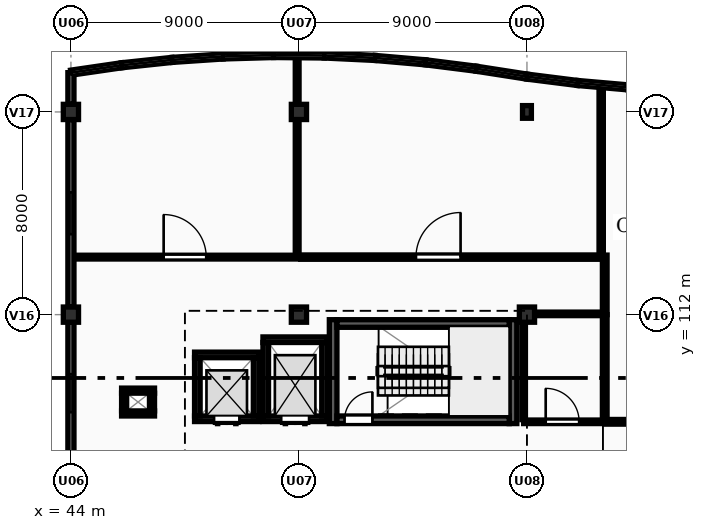
"""IFC4 building model, lengths in metres.
Left out: names, types, materials, properties, quantities, classifications, styles, units other than length and angle.
Written with IfcOpenShell. Run it as: python <this file> out.ifc"""

import sys

from ifc_helpers import new_model, si_unit, direction, frame, frame_2d, origin, origin_2d, place, context, subcontext, project, spatial, rectangle, extrude, element, fill, save


model = new_model("IFC4")
c1 = context("Model", 3, precision=1e-05, world=origin(), true_north=direction((0.0, 1.0)))
c2 = subcontext(c1, "Body", "Model", "MODEL_VIEW")
j1 = project(units=[si_unit("LENGTHUNIT", "METRE"), si_unit("PLANEANGLEUNIT", "RADIAN")], contexts=[c1])
p1 = place(None, origin())
s1 = spatial("IfcSite", under=j1, at=p1, CompositionType="ELEMENT")
p2 = place(p1, origin())
s2 = spatial("IfcBuilding", under=s1, at=p2, CompositionType="ELEMENT")
p3 = place(p2, frame((0.0, 0.0, 4.5)))
s3 = spatial("IfcBuildingStorey", under=s2, at=p3, CompositionType="ELEMENT", Elevation=4.5)
for number, where, z_axis, x_axis in (
    (1, (44.0, 112.0, 0.0), (0.0, 0.0, 1.0), (1.0, 0.0, 0.0)),
    (2, (44.0, 120.0, 0.0), (0.0, 0.0, 1.0), (1.0, 0.0, 0.0)),
    (3, (53.0, 112.0, 0.0), (0.0, 0.0, 1.0), (1.0, 0.0, 0.0)),
    (4, (53.0, 120.0, 0.0), (0.0, 0.0, 1.0), (1.0, 0.0, 0.0)),
    (5, (62.0, 112.0, 0.0), (0.0, 0.0, 1.0), (1.0, 0.0, 0.0)),
):
    element("IfcColumn", number, at=place(p3, frame(where, z_axis=z_axis, x_axis=x_axis)), inside=s3, PredefinedType="COLUMN", context=c2, shape_type="SweptSolid", body=[
        extrude(rectangle(XDim=0.6, YDim=0.6, at=origin_2d()), origin(), (0.0, 0.0, 1.0), 3.9),
    ])
p4 = place(p3, frame((62.0, 120.0, 0.0), z_axis=(0.0, 0.0, 1.0), x_axis=(1.0, 0.0, 0.0)))
e6 = element("IfcColumn", 6, at=p4, inside=s3, PredefinedType="PILASTER", context=c2, shape_type="SweptSolid", body=[
    extrude(rectangle(XDim=0.35, YDim=0.5, at=origin_2d()), origin(), (0.0, 0.0, 1.0), 3.9),
])
p5 = place(p3, frame((44.0, 121.55, 0.0), z_axis=(0.0, 0.0, 1.0), x_axis=(0.989544477223, 0.144228040259, 0.0)))
e7 = element("IfcWall", 7, at=p5, inside=s3, PredefinedType="SOLIDWALL", context=c2, shape_type="SweptSolid", body=[
    extrude(rectangle(XDim=2.021, YDim=0.2, at=frame_2d((1.011, 0.0))), origin(), (0.0, 0.0, 1.0), 0.95),
])
p6 = place(p3, frame((46.0, 121.842, 0.0), z_axis=(0.0, 0.0, 1.0), x_axis=(0.994395160059, 0.105727317433, 0.0)))
e8 = element("IfcWall", 8, at=p6, inside=s3, PredefinedType="SOLIDWALL", context=c2, shape_type="SweptSolid", body=[
    extrude(rectangle(XDim=2.011, YDim=0.2, at=frame_2d((1.006, 0.0))), origin(), (0.0, 0.0, 1.0), 0.95),
])
p7 = place(p3, frame((48.0, 122.054, 0.0), z_axis=(0.0, 0.0, 1.0), x_axis=(0.997729302978, 0.067351599676, 0.0)))
e9 = element("IfcWall", 9, at=p7, inside=s3, PredefinedType="SOLIDWALL", context=c2, shape_type="SweptSolid", body=[
    extrude(rectangle(XDim=2.005, YDim=0.2, at=frame_2d((1.002, 0.0))), origin(), (0.0, 0.0, 1.0), 0.95),
])
p8 = place(p3, frame((50.0, 122.189, 0.0), z_axis=(0.0, 0.0, 1.0), x_axis=(0.999581770858, 0.028918564416, 0.0)))
e10 = element("IfcWall", 10, at=p8, inside=s3, PredefinedType="SOLIDWALL", context=c2, shape_type="SweptSolid", body=[
    extrude(rectangle(XDim=2.001, YDim=0.2, at=frame_2d((1.0, 0.0))), origin(), (0.0, 0.0, 1.0), 0.95),
])
p9 = place(p3, frame((52.0, 122.247, 0.0), z_axis=(0.0, 0.0, 1.0), x_axis=(0.999953504169, -0.009643106302, 0.0)))
e11 = element("IfcWall", 11, at=p9, inside=s3, PredefinedType="SOLIDWALL", context=c2, shape_type="SweptSolid", body=[
    extrude(rectangle(XDim=2.0, YDim=0.2, at=frame_2d((1.0, 0.0))), origin(), (0.0, 0.0, 1.0), 0.95),
])
p10 = place(p3, frame((54.0, 122.228, 0.0), z_axis=(0.0, 0.0, 1.0), x_axis=(0.99884540439, -0.048040172037, 0.0)))
e12 = element("IfcWall", 12, at=p10, inside=s3, PredefinedType="SOLIDWALL", context=c2, shape_type="SweptSolid", body=[
    extrude(rectangle(XDim=2.002, YDim=0.2, at=frame_2d((1.001, 0.0))), origin(), (0.0, 0.0, 1.0), 0.95),
])
p11 = place(p3, frame((56.0, 122.132, 0.0), z_axis=(0.0, 0.0, 1.0), x_axis=(0.996244237948, -0.086587633962, 0.0)))
e13 = element("IfcWall", 13, at=p11, inside=s3, PredefinedType="SOLIDWALL", context=c2, shape_type="SweptSolid", body=[
    extrude(rectangle(XDim=2.008, YDim=0.2, at=frame_2d((1.004, 0.0))), origin(), (0.0, 0.0, 1.0), 0.95),
])
p12 = place(p3, frame((58.0, 121.958, 0.0), z_axis=(0.0, 0.0, 1.0), x_axis=(0.992158168336, -0.124988675503, 0.0)))
e14 = element("IfcWall", 14, at=p12, inside=s3, PredefinedType="SOLIDWALL", context=c2, shape_type="SweptSolid", body=[
    extrude(rectangle(XDim=2.016, YDim=0.2, at=frame_2d((1.008, 0.0))), origin(), (0.0, 0.0, 1.0), 0.95),
])
p13 = place(p3, frame((60.0, 121.706, 0.0), z_axis=(0.0, 0.0, 1.0), x_axis=(0.988085509852, -0.153905897287, 0.0)))
e15 = element("IfcWall", 15, at=p13, inside=s3, PredefinedType="SOLIDWALL", context=c2, shape_type="SweptSolid", body=[
    extrude(rectangle(XDim=2.024, YDim=0.2, at=frame_2d((1.012, 0.0))), origin(), (0.0, 0.0, 1.0), 0.95),
])
p14 = place(p3, frame((62.0, 121.394, 0.0), z_axis=(0.0, 0.0, 1.0), x_axis=(0.992158168336, -0.124988675503, 0.0)))
e16 = element("IfcWall", 16, at=p14, inside=s3, PredefinedType="SOLIDWALL", context=c2, shape_type="SweptSolid", body=[
    extrude(rectangle(XDim=2.016, YDim=0.2, at=frame_2d((1.008, 0.0))), origin(), (0.0, 0.0, 1.0), 0.95),
])
p15 = place(p3, frame((64.0, 121.142, 0.0), z_axis=(0.0, 0.0, 1.0), x_axis=(0.996244237948, -0.086587633962, 0.0)))
e17 = element("IfcWall", 17, at=p15, inside=s3, PredefinedType="SOLIDWALL", context=c2, shape_type="SweptSolid", body=[
    extrude(rectangle(XDim=2.008, YDim=0.2, at=frame_2d((1.004, 0.0))), origin(), (0.0, 0.0, 1.0), 0.95),
])
p16 = place(p3, frame((44.0, 104.3, 0.0), z_axis=(0.0, 0.0, 1.0), x_axis=(0.0, 1.0, 0.0)))
e18 = element("IfcWall", 18, at=p16, inside=s3, PredefinedType="SOLIDWALL", context=c2, shape_type="SweptSolid", body=[
    extrude(rectangle(XDim=7.4, YDim=0.24, at=frame_2d((3.7, 0.0))), origin(), (0.0, 0.0, 1.0), 2.945),
])
p17 = place(p16, frame((3.85, 0.0, 0.95)))
e19 = element("IfcOpeningElement", 19, at=p17, cuts=e18, PredefinedType="OPENING", context=c2, shape_type="SweptSolid", body=[
    extrude(rectangle(XDim=1.5, YDim=1.5, at=frame_2d((0.75, 0.75))), frame((0.0, 0.13, 0.0), z_axis=(0.0, -1.0, 0.0), x_axis=(1.0, 0.0, 0.0)), (0.0, 0.0, 1.0), 0.26),
])
p18 = place(p3, frame((44.0, 112.3, 0.0), z_axis=(0.0, 0.0, 1.0), x_axis=(0.0, 1.0, 0.0)))
e20 = element("IfcWall", 20, at=p18, inside=s3, PredefinedType="SOLIDWALL", context=c2, shape_type="SweptSolid", body=[
    extrude(rectangle(XDim=7.4, YDim=0.24, at=frame_2d((3.7, 0.0))), origin(), (0.0, 0.0, 1.0), 2.945),
])
p19 = place(p18, frame((2.875, 0.0, 0.95)))
e21 = element("IfcOpeningElement", 21, at=p19, cuts=e20, PredefinedType="OPENING", context=c2, shape_type="SweptSolid", body=[
    extrude(rectangle(XDim=1.65, YDim=1.5, at=frame_2d((0.825, 0.75))), frame((0.0, 0.13, 0.0), z_axis=(0.0, -1.0, 0.0), x_axis=(1.0, 0.0, 0.0)), (0.0, 0.0, 1.0), 0.26),
])
p20 = place(p3, frame((44.0, 120.3, 0.0), z_axis=(0.0, 0.0, 1.0), x_axis=(0.0, 1.0, 0.0)))
e22 = element("IfcWall", 22, at=p20, inside=s3, PredefinedType="SOLIDWALL", context=c2, shape_type="SweptSolid", body=[
    extrude(rectangle(XDim=1.25, YDim=0.24, at=frame_2d((0.625, 0.0))), origin(), (0.0, 0.0, 1.0), 2.945),
])
for number, where, z_axis, x_axis in (
    (23, (54.35, 107.7, 0.0), (0.0, 0.0, 1.0), (0.0, 1.0, 0.0)),
    (24, (61.45, 111.8, 0.0), (0.0, 0.0, 1.0), (0.0, -1.0, 0.0)),
):
    element("IfcWall", number, at=place(p3, frame(where, z_axis=z_axis, x_axis=x_axis)), inside=s3, PredefinedType="SHEAR", context=c2, shape_type="SweptSolid", body=[
        extrude(rectangle(XDim=4.1, YDim=0.3, at=frame_2d((2.05, 0.0))), origin(), (0.0, 0.0, 1.0), 3.65),
    ])
p21 = place(p3, frame((54.5, 107.85, 0.0), z_axis=(0.0, 0.0, 1.0), x_axis=(1.0, 0.0, 0.0)))
e25 = element("IfcWall", 25, at=p21, inside=s3, PredefinedType="SHEAR", context=c2, shape_type="SweptSolid", body=[
    extrude(rectangle(XDim=6.8, YDim=0.3, at=frame_2d((3.4, 0.0))), origin(), (0.0, 0.0, 1.0), 3.65),
])
p22 = place(p21, frame((0.3, 0.0, 0.0)))
e26 = element("IfcOpeningElement", 26, at=p22, cuts=e25, PredefinedType="OPENING", context=c2, shape_type="SweptSolid", body=[
    extrude(rectangle(XDim=1.1, YDim=2.15, at=frame_2d((0.55, 1.075))), frame((0.0, 0.16, 0.0), z_axis=(0.0, -1.0, 0.0), x_axis=(1.0, 0.0, 0.0)), (0.0, 0.0, 1.0), 0.32),
])
p23 = place(p3, frame((61.3, 111.65, 0.0), z_axis=(0.0, 0.0, 1.0), x_axis=(-1.0, 0.0, 0.0)))
e27 = element("IfcWall", 27, at=p23, inside=s3, PredefinedType="SHEAR", context=c2, shape_type="SweptSolid", body=[
    extrude(rectangle(XDim=6.8, YDim=0.3, at=frame_2d((3.4, 0.0))), origin(), (0.0, 0.0, 1.0), 3.65),
])
p24 = place(p3, frame((54.12, 107.89, 0.0), z_axis=(0.0, 0.0, 1.0), x_axis=(-1.0, 0.0, 0.0)))
e28 = element("IfcWall", 28, at=p24, inside=s3, PredefinedType="SHEAR", context=c2, shape_type="SweptSolid", body=[
    extrude(rectangle(XDim=2.54, YDim=0.22, at=frame_2d((1.27, 0.0))), origin(), (0.0, 0.0, 1.0), 3.65),
])
p25 = place(p24, frame((0.72, 0.0, 0.0)))
e29 = element("IfcOpeningElement", 29, at=p25, cuts=e28, PredefinedType="OPENING", context=c2, shape_type="SweptSolid", body=[
    extrude(rectangle(XDim=1.1, YDim=2.15, at=frame_2d((0.55, 1.075))), frame((0.0, 0.12, 0.0), z_axis=(0.0, -1.0, 0.0), x_axis=(1.0, 0.0, 0.0)), (0.0, 0.0, 1.0), 0.24),
])
p26 = place(p3, frame((51.58, 111.01, 0.0), z_axis=(0.0, 0.0, 1.0), x_axis=(1.0, 0.0, 0.0)))
e30 = element("IfcWall", 30, at=p26, inside=s3, PredefinedType="SHEAR", context=c2, shape_type="SweptSolid", body=[
    extrude(rectangle(XDim=2.54, YDim=0.22, at=frame_2d((1.27, 0.0))), origin(), (0.0, 0.0, 1.0), 3.65),
])
for number, where, z_axis, x_axis in (
    (31, (51.69, 108.0, 0.0), (0.0, 0.0, 1.0), (0.0, 1.0, 0.0)),
    (32, (54.01, 110.9, 0.0), (0.0, 0.0, 1.0), (0.0, -1.0, 0.0)),
):
    element("IfcWall", number, at=place(p3, frame(where, z_axis=z_axis, x_axis=x_axis)), inside=s3, PredefinedType="SHEAR", context=c2, shape_type="SweptSolid", body=[
        extrude(rectangle(XDim=2.9, YDim=0.22, at=frame_2d((1.45, 0.0))), origin(), (0.0, 0.0, 1.0), 3.65),
    ])
p27 = place(p3, frame((51.42, 107.89, 0.0), z_axis=(0.0, 0.0, 1.0), x_axis=(-1.0, 0.0, 0.0)))
e33 = element("IfcWall", 33, at=p27, inside=s3, PredefinedType="SHEAR", context=c2, shape_type="SweptSolid", body=[
    extrude(rectangle(XDim=2.54, YDim=0.22, at=frame_2d((1.27, 0.0))), origin(), (0.0, 0.0, 1.0), 3.65),
])
p28 = place(p27, frame((0.77, 0.0, 0.0)))
e34 = element("IfcOpeningElement", 34, at=p28, cuts=e33, PredefinedType="OPENING", context=c2, shape_type="SweptSolid", body=[
    extrude(rectangle(XDim=1.0, YDim=2.15, at=frame_2d((0.5, 1.075))), frame((0.0, 0.12, 0.0), z_axis=(0.0, -1.0, 0.0), x_axis=(1.0, 0.0, 0.0)), (0.0, 0.0, 1.0), 0.24),
])
p29 = place(p3, frame((48.88, 110.41, 0.0), z_axis=(0.0, 0.0, 1.0), x_axis=(1.0, 0.0, 0.0)))
e35 = element("IfcWall", 35, at=p29, inside=s3, PredefinedType="SHEAR", context=c2, shape_type="SweptSolid", body=[
    extrude(rectangle(XDim=2.54, YDim=0.22, at=frame_2d((1.27, 0.0))), origin(), (0.0, 0.0, 1.0), 3.65),
])
for number, where, z_axis, x_axis in (
    (36, (48.99, 108.0, 0.0), (0.0, 0.0, 1.0), (0.0, 1.0, 0.0)),
    (37, (51.31, 110.3, 0.0), (0.0, 0.0, 1.0), (0.0, -1.0, 0.0)),
):
    element("IfcWall", number, at=place(p3, frame(where, z_axis=z_axis, x_axis=x_axis)), inside=s3, PredefinedType="SHEAR", context=c2, shape_type="SweptSolid", body=[
        extrude(rectangle(XDim=2.3, YDim=0.22, at=frame_2d((1.15, 0.0))), origin(), (0.0, 0.0, 1.0), 3.65),
    ])
for number, where, z_axis, x_axis in (
    (38, (47.3, 108.1, 0.0), (0.0, 0.0, 1.0), (-1.0, 0.0, 0.0)),
    (39, (46.0, 109.0, 0.0), (0.0, 0.0, 1.0), (1.0, 0.0, 0.0)),
):
    element("IfcWall", number, at=place(p3, frame(where, z_axis=z_axis, x_axis=x_axis)), inside=s3, PredefinedType="PARTITIONING", context=c2, shape_type="SweptSolid", body=[
        extrude(rectangle(XDim=1.3, YDim=0.2, at=frame_2d((0.65, 0.0))), origin(), (0.0, 0.0, 1.0), 3.65),
    ])
p30 = place(p3, frame((46.1, 108.2, 0.0), z_axis=(0.0, 0.0, 1.0), x_axis=(0.0, 1.0, 0.0)))
e40 = element("IfcWall", 40, at=p30, inside=s3, PredefinedType="PARTITIONING", context=c2, shape_type="SweptSolid", body=[
    extrude(rectangle(XDim=0.7, YDim=0.2, at=frame_2d((0.35, 0.0))), origin(), (0.0, 0.0, 1.0), 3.65),
])
p31 = place(p3, frame((47.2, 108.9, 0.0), z_axis=(0.0, 0.0, 1.0), x_axis=(0.0, -1.0, 0.0)))
e41 = element("IfcWall", 41, at=p31, inside=s3, PredefinedType="PARTITIONING", context=c2, shape_type="SweptSolid", body=[
    extrude(rectangle(XDim=0.7, YDim=0.2, at=frame_2d((0.35, 0.0))), origin(), (0.0, 0.0, 1.0), 3.245),
])
p32 = place(p3, frame((44.162, 114.27, 0.0), z_axis=(0.0, 0.0, 1.0), x_axis=(1.0, 0.0, 0.0)))
e42 = element("IfcWall", 42, at=p32, inside=s3, PredefinedType="PARTITIONING", context=c2, shape_type="SweptSolid", body=[
    extrude(rectangle(XDim=8.768, YDim=0.15, at=frame_2d((4.384, 0.0))), origin(), (0.0, 0.0, 1.0), 3.65),
])
p33 = place(p32, frame((3.498, 0.0, 0.0)))
e43 = element("IfcOpeningElement", 43, at=p33, cuts=e42, PredefinedType="OPENING", context=c2, shape_type="SweptSolid", body=[
    extrude(rectangle(XDim=1.68, YDim=2.2, at=frame_2d((0.84, 1.1))), frame((0.0, 0.085, 0.0), z_axis=(0.0, -1.0, 0.0), x_axis=(1.0, 0.0, 0.0)), (0.0, 0.0, 1.0), 0.17),
])
p34 = place(p3, frame((52.93, 114.36, 0.0), z_axis=(0.0, 0.0, 1.0), x_axis=(0.0, 1.0, 0.0)))
e44 = element("IfcWall", 44, at=p34, inside=s3, PredefinedType="PARTITIONING", context=c2, shape_type="SweptSolid", body=[
    extrude(rectangle(XDim=7.736, YDim=0.15, at=frame_2d((3.868, 0.0))), origin(), (0.0, 0.0, 1.0), 2.995),
])
p35 = place(p3, frame((53.07, 114.27, 0.0), z_axis=(0.0, 0.0, 1.0), x_axis=(1.0, 0.0, 0.0)))
e45 = element("IfcWall", 45, at=p35, inside=s3, PredefinedType="PARTITIONING", context=c2, shape_type="SweptSolid", body=[
    extrude(rectangle(XDim=11.86, YDim=0.17, at=frame_2d((5.93, 0.0))), origin(), (0.0, 0.0, 1.0), 3.65),
])
p36 = place(p35, frame((4.55, 0.0, 0.0)))
e46 = element("IfcOpeningElement", 46, at=p36, cuts=e45, PredefinedType="OPENING", context=c2, shape_type="SweptSolid", body=[
    extrude(rectangle(XDim=1.76, YDim=2.2, at=frame_2d((0.88, 1.1))), frame((0.0, 0.095, 0.0), z_axis=(0.0, -1.0, 0.0), x_axis=(1.0, 0.0, 0.0)), (0.0, 0.0, 1.0), 0.19),
])
p37 = place(p3, frame((64.93, 114.37, 0.0), z_axis=(0.0, 0.0, 1.0), x_axis=(0.0, 1.0, 0.0)))
e47 = element("IfcWall", 47, at=p37, inside=s3, PredefinedType="PARTITIONING", context=c2, shape_type="SweptSolid", body=[
    extrude(rectangle(XDim=6.549, YDim=0.17, at=frame_2d((3.275, 0.0))), origin(), (0.0, 0.0, 1.0), 3.65),
])
p38 = place(p3, frame((65.07, 107.77, 0.0), z_axis=(0.0, 0.0, 1.0), x_axis=(1.0, 0.0, 0.0)))
e48 = element("IfcWall", 48, at=p38, inside=s3, PredefinedType="PARTITIONING", context=c2, shape_type="SweptSolid", body=[
    extrude(rectangle(XDim=7.86, YDim=0.185, at=frame_2d((3.93, 0.0))), origin(), (0.0, 0.0, 1.0), 3.65),
])
p39 = place(p38, frame((3.27, 0.0, 0.0)))
e49 = element("IfcOpeningElement", 49, at=p39, cuts=e48, PredefinedType="OPENING", context=c2, shape_type="SweptSolid", body=[
    extrude(rectangle(XDim=0.92, YDim=2.2, at=frame_2d((0.46, 1.1))), frame((0.0, 0.103, 0.0), z_axis=(0.0, -1.0, 0.0), x_axis=(1.0, 0.0, 0.0)), (0.0, 0.0, 1.0), 0.205),
])
p40 = place(p3, frame((65.07, 107.877, 0.0), z_axis=(0.0, 0.0, 1.0), x_axis=(0.0, 1.0, 0.0)))
e50 = element("IfcWall", 50, at=p40, inside=s3, PredefinedType="PARTITIONING", context=c2, shape_type="SweptSolid", body=[
    extrude(rectangle(XDim=4.123, YDim=0.185, at=frame_2d((2.061, 0.0))), origin(), (0.0, 0.0, 1.0), 3.65),
])
p41 = place(p3, frame((65.07, 112.0, 0.0), z_axis=(0.0, 0.0, 1.0), x_axis=(0.0, 1.0, 0.0)))
e51 = element("IfcWall", 51, at=p41, inside=s3, PredefinedType="PARTITIONING", context=c2, shape_type="SweptSolid", body=[
    extrude(rectangle(XDim=2.35, YDim=0.185, at=frame_2d((1.175, 0.0))), origin(), (0.0, 0.0, 1.0), 3.65),
])
p42 = place(p3, frame((61.87, 107.77, 0.0), z_axis=(0.0, 0.0, 1.0), x_axis=(1.0, 0.0, 0.0)))
e52 = element("IfcWall", 52, at=p42, inside=s3, PredefinedType="PARTITIONING", context=c2, shape_type="SweptSolid", body=[
    extrude(rectangle(XDim=3.06, YDim=0.14, at=frame_2d((1.53, 0.0))), origin(), (0.0, 0.0, 1.0), 3.65),
])
p43 = place(p42, frame((0.87, 0.0, 0.0)))
e53 = element("IfcOpeningElement", 53, at=p43, cuts=e52, PredefinedType="OPENING", context=c2, shape_type="SweptSolid", body=[
    extrude(rectangle(XDim=1.32, YDim=2.2, at=frame_2d((0.66, 1.1))), frame((0.0, 0.08, 0.0), z_axis=(0.0, -1.0, 0.0), x_axis=(1.0, 0.0, 0.0)), (0.0, 0.0, 1.0), 0.16),
])
p44 = place(p3, frame((62.315, 112.03, 0.0), z_axis=(0.0, 0.0, 1.0), x_axis=(1.0, 0.0, 0.0)))
e54 = element("IfcWall", 54, at=p44, inside=s3, PredefinedType="PARTITIONING", context=c2, shape_type="SweptSolid", body=[
    extrude(rectangle(XDim=2.615, YDim=0.14, at=frame_2d((1.308, 0.0))), origin(), (0.0, 0.0, 1.0), 3.65),
])
p45 = place(p3, frame((61.87, 107.855, 0.0), z_axis=(0.0, 0.0, 1.0), x_axis=(0.0, 1.0, 0.0)))
e55 = element("IfcWall", 55, at=p45, inside=s3, PredefinedType="PARTITIONING", context=c2, shape_type="SweptSolid", body=[
    extrude(rectangle(XDim=3.83, YDim=0.14, at=frame_2d((1.915, 0.0))), origin(), (0.0, 0.0, 1.0), 3.65),
])
p46 = place(p17, origin())
e56 = element("IfcWindow", 56, at=p46, inside=s3, PartitioningType="SINGLE_PANEL", PredefinedType="WINDOW", context=c2, shape_type="SweptSolid", body=[
    extrude(rectangle(XDim=1.5, YDim=1.5, at=frame_2d((0.75, 0.75))), frame((0.0, 0.03, 0.0), z_axis=(0.0, -1.0, 0.0), x_axis=(1.0, 0.0, 0.0)), (0.0, 0.0, 1.0), 0.06),
])
fill(e19, e56)
p47 = place(p19, origin())
e57 = element("IfcWindow", 57, at=p47, inside=s3, PartitioningType="DOUBLE_PANEL_VERTICAL", PredefinedType="WINDOW", context=c2, shape_type="SweptSolid", body=[
    extrude(rectangle(XDim=1.65, YDim=1.5, at=frame_2d((0.825, 0.75))), frame((0.0, 0.03, 0.0), z_axis=(0.0, -1.0, 0.0), x_axis=(1.0, 0.0, 0.0)), (0.0, 0.0, 1.0), 0.06),
])
fill(e21, e57)
p48 = place(p22, origin())
e58 = element("IfcDoor", 58, at=p48, inside=s3, OperationType="SINGLE_SWING_RIGHT", PredefinedType="DOOR", context=c2, shape_type="SweptSolid", body=[
    extrude(rectangle(XDim=1.1, YDim=2.15, at=frame_2d((0.55, 1.075))), frame((0.0, 0.025, 0.0), z_axis=(0.0, -1.0, 0.0), x_axis=(1.0, 0.0, 0.0)), (0.0, 0.0, 1.0), 0.05),
])
fill(e26, e58)
p49 = place(p25, origin())
e59 = element("IfcDoor", 59, at=p49, inside=s3, OperationType="DOUBLE_DOOR_SLIDING", PredefinedType="DOOR", context=c2, shape_type="SweptSolid", body=[
    extrude(rectangle(XDim=1.1, YDim=2.15, at=frame_2d((0.55, 1.075))), frame((0.0, 0.025, 0.0), z_axis=(0.0, -1.0, 0.0), x_axis=(1.0, 0.0, 0.0)), (0.0, 0.0, 1.0), 0.05),
])
fill(e29, e59)
p50 = place(p28, origin())
e60 = element("IfcDoor", 60, at=p50, inside=s3, OperationType="DOUBLE_DOOR_SLIDING", PredefinedType="DOOR", context=c2, shape_type="SweptSolid", body=[
    extrude(rectangle(XDim=1.0, YDim=2.15, at=frame_2d((0.5, 1.075))), frame((0.0, 0.025, 0.0), z_axis=(0.0, -1.0, 0.0), x_axis=(1.0, 0.0, 0.0)), (0.0, 0.0, 1.0), 0.05),
])
fill(e34, e60)
p51 = place(p33, origin())
e61 = element("IfcDoor", 61, at=p51, inside=s3, OperationType="SINGLE_SWING_LEFT", PredefinedType="DOOR", context=c2, shape_type="SweptSolid", body=[
    extrude(rectangle(XDim=1.68, YDim=2.2, at=frame_2d((0.84, 1.1))), frame((0.0, 0.025, 0.0), z_axis=(0.0, -1.0, 0.0), x_axis=(1.0, 0.0, 0.0)), (0.0, 0.0, 1.0), 0.05),
])
fill(e43, e61)
p52 = place(p36, origin())
e62 = element("IfcDoor", 62, at=p52, inside=s3, OperationType="SINGLE_SWING_RIGHT", PredefinedType="DOOR", context=c2, shape_type="SweptSolid", body=[
    extrude(rectangle(XDim=1.76, YDim=2.2, at=frame_2d((0.88, 1.1))), frame((0.0, 0.025, 0.0), z_axis=(0.0, -1.0, 0.0), x_axis=(1.0, 0.0, 0.0)), (0.0, 0.0, 1.0), 0.05),
])
fill(e46, e62)
p53 = place(p43, origin())
e63 = element("IfcDoor", 63, at=p53, inside=s3, OperationType="SINGLE_SWING_LEFT", PredefinedType="DOOR", context=c2, shape_type="SweptSolid", body=[
    extrude(rectangle(XDim=1.32, YDim=2.2, at=frame_2d((0.66, 1.1))), frame((0.0, 0.025, 0.0), z_axis=(0.0, -1.0, 0.0), x_axis=(1.0, 0.0, 0.0)), (0.0, 0.0, 1.0), 0.05),
])
fill(e53, e63)
save(model, sys.argv[1])
